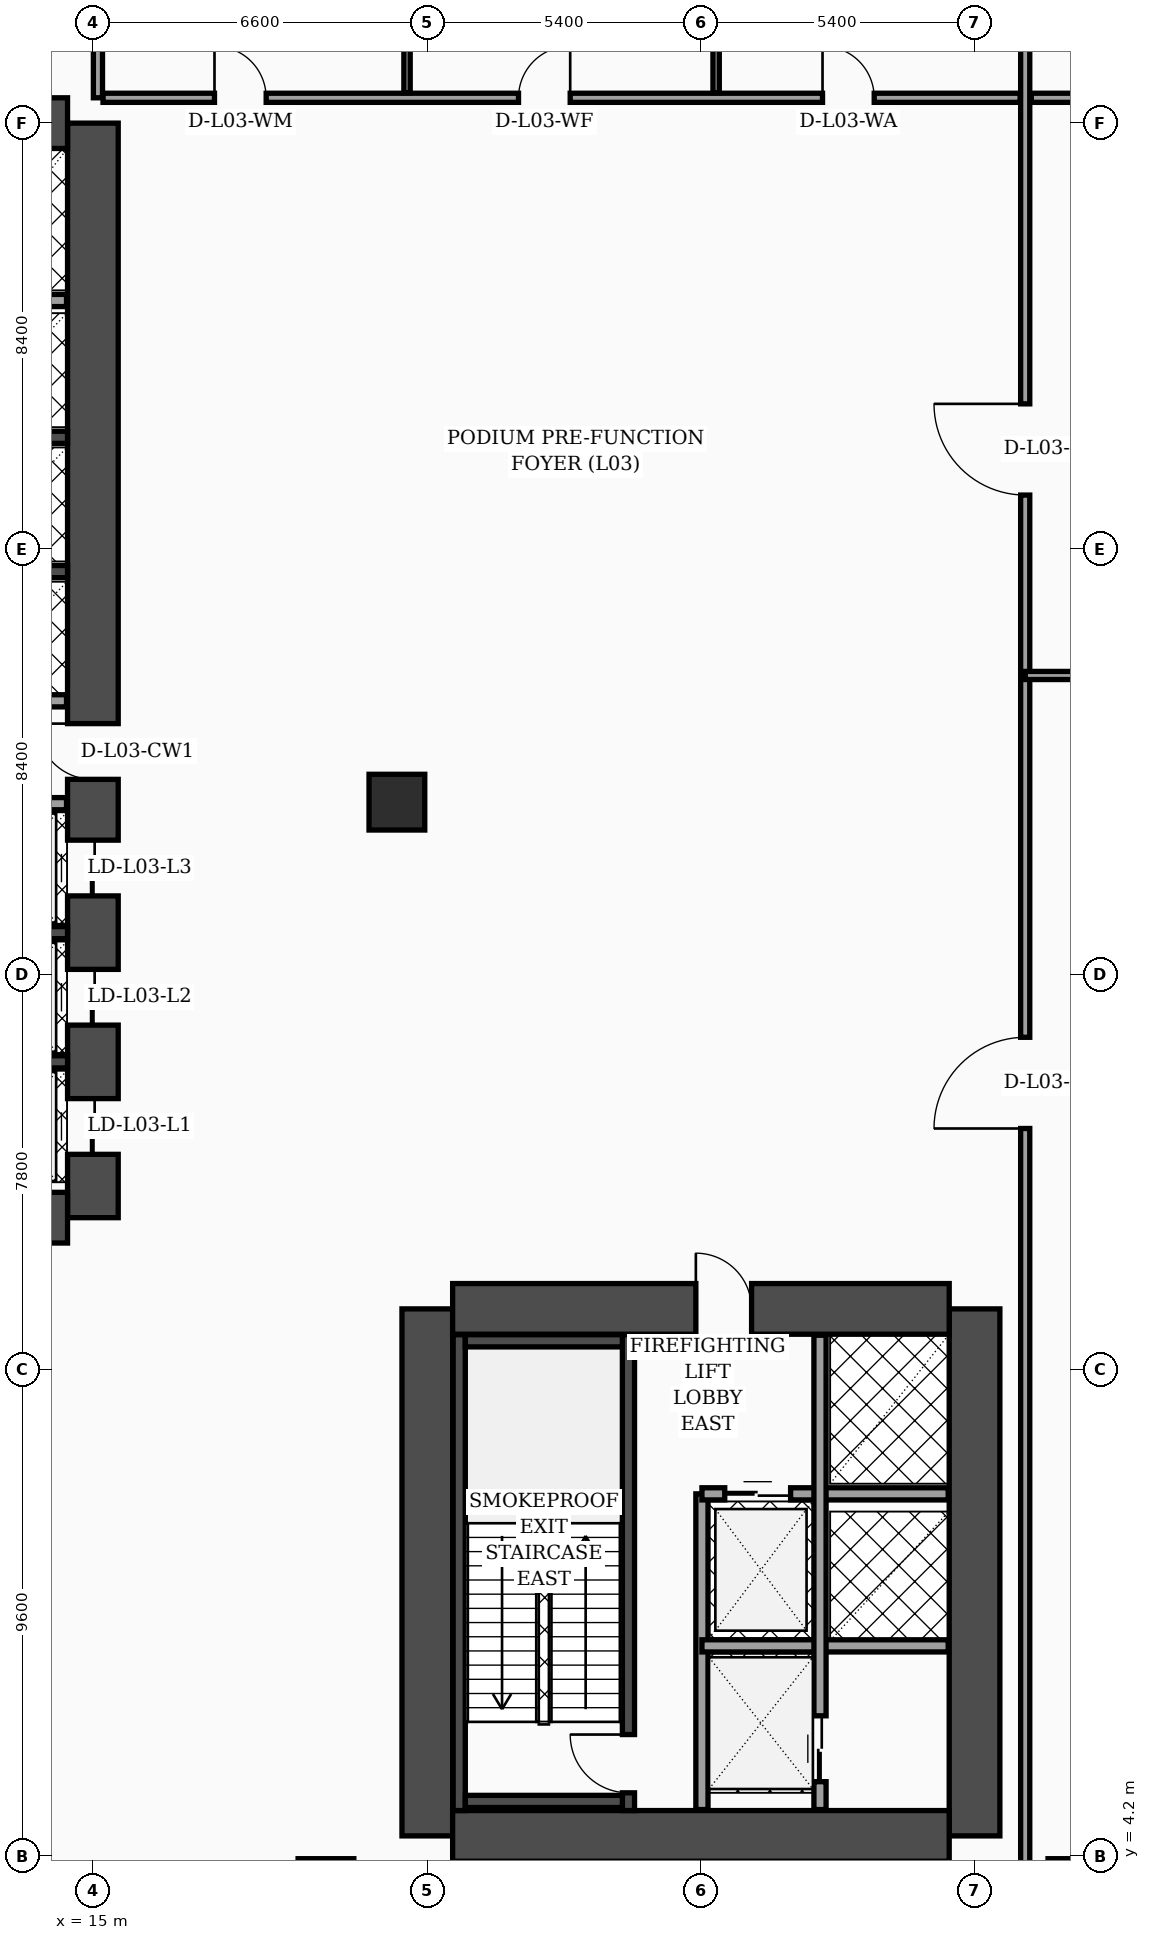
"""IFC4 building model, lengths in metres.
Left out: names, types, materials, properties, quantities, classifications, styles, units other than length and angle.
Written with IfcOpenShell. Run it as: python <this file> out.ifc"""

import sys

from ifc_helpers import new_model, si_unit, direction, frame, frame_2d, origin, origin_2d, place, context, subcontext, project, spatial, rectangle, hollow_rectangle, extrude, element, fill, save


model = new_model("IFC4")
c1 = context("Model", 3, precision=1e-05, world=origin(), true_north=direction((0.0, 1.0)))
c2 = subcontext(c1, "Body", "Model", "MODEL_VIEW")
j1 = project(units=[si_unit("LENGTHUNIT", "METRE"), si_unit("PLANEANGLEUNIT", "RADIAN")], contexts=[c1])
p1 = place(None, origin())
s1 = spatial("IfcSite", under=j1, at=p1, CompositionType="ELEMENT")
p2 = place(p1, origin())
s2 = spatial("IfcBuilding", under=s1, at=p2, CompositionType="ELEMENT")
p3 = place(p2, frame((0.0, 0.0, 17.0)))
s3 = spatial("IfcBuildingStorey", under=s2, at=p3, CompositionType="ELEMENT", Elevation=17.0)
p4 = place(p3, frame((15.0, 16.8, 0.0), z_axis=(0.0, 0.0, 1.0), x_axis=(0.0, 1.0, 0.0)))
e1 = element("IfcWall", 1, at=p4, inside=s3, PredefinedType="SHEAR", context=c2, shape_type="SweptSolid", body=[
    extrude(rectangle(XDim=21.6, YDim=1.0, at=frame_2d((10.8, 0.0))), origin(), (0.0, 0.0, 1.0), 4.55),
])
p5 = place(p4, frame((8.65, 0.0, 0.0)))
e2 = element("IfcOpeningElement", 2, at=p5, cuts=e1, PredefinedType="OPENING", context=c2, shape_type="SweptSolid", body=[
    extrude(rectangle(XDim=1.1, YDim=2.2, at=frame_2d((0.55, 1.1))), frame((0.0, 0.51, 0.0), z_axis=(0.0, -1.0, 0.0), x_axis=(1.0, 0.0, 0.0)), (0.0, 0.0, 1.0), 1.02),
])
p6 = place(p4, frame((1.25, 0.0, 0.0)))
e3 = element("IfcOpeningElement", 3, at=p6, cuts=e1, PredefinedType="OPENING", context=c2, shape_type="SweptSolid", body=[
    extrude(rectangle(XDim=1.1, YDim=2.2, at=frame_2d((0.55, 1.1))), frame((0.0, 0.51, 0.0), z_axis=(0.0, -1.0, 0.0), x_axis=(1.0, 0.0, 0.0)), (0.0, 0.0, 1.0), 1.02),
])
p7 = place(p4, frame((3.8, 0.0, 0.0)))
e4 = element("IfcOpeningElement", 4, at=p7, cuts=e1, PredefinedType="OPENING", context=c2, shape_type="SweptSolid", body=[
    extrude(rectangle(XDim=1.1, YDim=2.2, at=frame_2d((0.55, 1.1))), frame((0.0, 0.51, 0.0), z_axis=(0.0, -1.0, 0.0), x_axis=(1.0, 0.0, 0.0)), (0.0, 0.0, 1.0), 1.02),
])
p8 = place(p4, frame((6.35, 0.0, 0.0)))
e5 = element("IfcOpeningElement", 5, at=p8, cuts=e1, PredefinedType="OPENING", context=c2, shape_type="SweptSolid", body=[
    extrude(rectangle(XDim=1.1, YDim=2.2, at=frame_2d((0.55, 1.1))), frame((0.0, 0.51, 0.0), z_axis=(0.0, -1.0, 0.0), x_axis=(1.0, 0.0, 0.0)), (0.0, 0.0, 1.0), 1.02),
])
for number, where, z_axis, x_axis in (
    (6, (4.7, 38.4, 0.0), (0.0, 0.0, 1.0), (1.0, 0.0, 0.0)),
    (7, (4.7, 16.8, 0.0), (0.0, 0.0, 1.0), (1.0, 0.0, 0.0)),
):
    element("IfcWall", number, at=place(p3, frame(where, z_axis=z_axis, x_axis=x_axis)), inside=s3, PredefinedType="SHEAR", context=c2, shape_type="SweptSolid", body=[
        extrude(rectangle(XDim=9.8, YDim=1.0, at=frame_2d((4.9, 0.0))), origin(), (0.0, 0.0, 1.0), 4.55),
    ])
for number, where, z_axis, x_axis in (
    (8, (21.6, 4.6, 0.0), (0.0, 0.0, 1.0), (0.0, 1.0, 0.0)),
    (9, (32.4, 4.6, 0.0), (0.0, 0.0, 1.0), (0.0, 1.0, 0.0)),
):
    element("IfcWall", number, at=place(p3, frame(where, z_axis=z_axis, x_axis=x_axis)), inside=s3, PredefinedType="SHEAR", context=c2, shape_type="SweptSolid", body=[
        extrude(rectangle(XDim=10.4, YDim=1.0, at=frame_2d((5.2, 0.0))), origin(), (0.0, 0.0, 1.0), 4.55),
    ])
p9 = place(p3, frame((22.1, 15.0, 0.0), z_axis=(0.0, 0.0, 1.0), x_axis=(1.0, 0.0, 0.0)))
e10 = element("IfcWall", 10, at=p9, inside=s3, PredefinedType="SHEAR", context=c2, shape_type="SweptSolid", body=[
    extrude(rectangle(XDim=9.8, YDim=1.0, at=frame_2d((4.9, 0.0))), origin(), (0.0, 0.0, 1.0), 4.55),
])
p10 = place(p9, frame((4.8, 0.0, 0.0)))
e11 = element("IfcOpeningElement", 11, at=p10, cuts=e10, PredefinedType="OPENING", context=c2, shape_type="SweptSolid", body=[
    extrude(rectangle(XDim=1.1, YDim=2.2, at=frame_2d((0.55, 1.1))), frame((0.0, 0.51, 0.0), z_axis=(0.0, -1.0, 0.0), x_axis=(1.0, 0.0, 0.0)), (0.0, 0.0, 1.0), 1.02),
])
p11 = place(p3, frame((22.1, 4.6, 0.0), z_axis=(0.0, 0.0, 1.0), x_axis=(1.0, 0.0, 0.0)))
e12 = element("IfcWall", 12, at=p11, inside=s3, PredefinedType="SHEAR", context=c2, shape_type="SweptSolid", body=[
    extrude(rectangle(XDim=9.8, YDim=1.0, at=frame_2d((4.9, 0.0))), origin(), (0.0, 0.0, 1.0), 4.55),
])
p12 = place(p3, frame((22.23, 5.1, 0.0), z_axis=(0.0, 0.0, 1.0), x_axis=(0.0, 1.0, 0.0)))
e13 = element("IfcWall", 13, at=p12, inside=s3, PredefinedType="SOLIDWALL", context=c2, shape_type="SweptSolid", body=[
    extrude(rectangle(XDim=9.39, YDim=0.24, at=frame_2d((4.695, 0.0))), origin(), (0.0, 0.0, 1.0), 4.55),
])
p13 = place(p3, frame((25.57, 5.1, 0.0), z_axis=(0.0, 0.0, 1.0), x_axis=(0.0, 1.0, 0.0)))
e14 = element("IfcWall", 14, at=p13, inside=s3, PredefinedType="SOLIDWALL", context=c2, shape_type="SweptSolid", body=[
    extrude(rectangle(XDim=9.39, YDim=0.24, at=frame_2d((4.695, 0.0))), origin(), (0.0, 0.0, 1.0), 4.55),
])
p14 = place(p13, frame((0.35, 0.0, 0.0)))
e15 = element("IfcOpeningElement", 15, at=p14, cuts=e14, PredefinedType="OPENING", context=c2, shape_type="SweptSolid", body=[
    extrude(rectangle(XDim=1.15, YDim=2.2, at=frame_2d((0.575, 1.1))), frame((0.0, 0.13, 0.0), z_axis=(0.0, -1.0, 0.0), x_axis=(1.0, 0.0, 0.0)), (0.0, 0.0, 1.0), 0.26),
])
for number, where, z_axis, x_axis in (
    (16, (22.35, 5.28, 0.0), (0.0, 0.0, 1.0), (1.0, 0.0, 0.0)),
    (17, (22.35, 14.37, 0.0), (0.0, 0.0, 1.0), (1.0, 0.0, 0.0)),
):
    element("IfcWall", number, at=place(p3, frame(where, z_axis=z_axis, x_axis=x_axis)), inside=s3, PredefinedType="SOLIDWALL", context=c2, shape_type="SweptSolid", body=[
        extrude(rectangle(XDim=3.1, YDim=0.24, at=frame_2d((1.55, 0.0))), origin(), (0.0, 0.0, 1.0), 4.55),
    ])
for number, where, z_axis, x_axis in (
    (18, (12.18, 19.875, 0.0), (0.0, 0.0, 1.0), (1.0, 0.0, 0.0)),
    (19, (12.18, 22.425, 0.0), (0.0, 0.0, 1.0), (1.0, 0.0, 0.0)),
    (20, (12.18, 29.55, 0.0), (0.0, 0.0, 1.0), (1.0, 0.0, 0.0)),
    (21, (12.18, 32.2, 0.0), (0.0, 0.0, 1.0), (1.0, 0.0, 0.0)),
):
    element("IfcWall", number, at=place(p3, frame(where, z_axis=z_axis, x_axis=x_axis)), inside=s3, PredefinedType="SOLIDWALL", context=c2, shape_type="SweptSolid", body=[
        extrude(rectangle(XDim=2.32, YDim=0.24, at=frame_2d((1.16, 0.0))), origin(), (0.0, 0.0, 1.0), 4.55),
    ])
for number, where, z_axis, x_axis in (
    (22, (21.0, 25.0, 0.0), (0.0, 0.0, 1.0), (1.0, 0.0, 0.0)),
    (23, (19.6, 3.6, 0.0), (0.0, 0.0, 1.0), (1.0, 0.0, 0.0)),
    (24, (34.4, 3.6, 0.0), (0.0, 0.0, 1.0), (1.0, 0.0, 0.0)),
):
    element("IfcColumn", number, at=place(p3, frame(where, z_axis=z_axis, x_axis=x_axis)), inside=s3, PredefinedType="COLUMN", context=c2, shape_type="SweptSolid", body=[
        extrude(hollow_rectangle(XDim=1.1, YDim=1.1, WallThickness=0.045, at=origin_2d()), origin(), (0.0, 0.0, 1.0), 4.55),
    ])
p15 = place(p3, frame((12.15, 24.97, 0.0), z_axis=(0.0, 0.0, 1.0), x_axis=(1.0, 0.0, 0.0)))
e25 = element("IfcWall", 25, at=p15, inside=s3, PredefinedType="SOLIDWALL", context=c2, shape_type="SweptSolid", body=[
    extrude(rectangle(XDim=2.33, YDim=0.24, at=frame_2d((1.165, 0.0))), origin(), (0.0, 0.0, 1.0), 3.75),
])
p16 = place(p3, frame((12.25, 27.0, 0.0), z_axis=(0.0, 0.0, 1.0), x_axis=(1.0, 0.0, 0.0)))
e26 = element("IfcWall", 26, at=p16, inside=s3, PredefinedType="SOLIDWALL", context=c2, shape_type="SweptSolid", body=[
    extrude(rectangle(XDim=2.23, YDim=0.24, at=frame_2d((1.115, 0.0))), origin(), (0.0, 0.0, 1.0), 4.55),
])
p17 = place(p3, frame((9.66, 34.9, 0.0), z_axis=(0.0, 0.0, 1.0), x_axis=(1.0, 0.0, 0.0)))
e27 = element("IfcWall", 27, at=p17, inside=s3, PredefinedType="SOLIDWALL", context=c2, shape_type="SweptSolid", body=[
    extrude(rectangle(XDim=4.82, YDim=0.24, at=frame_2d((2.41, 0.0))), origin(), (0.0, 0.0, 1.0), 4.55),
])
p18 = place(p3, frame((27.02, 5.12, 0.0), z_axis=(0.0, 0.0, 1.0), x_axis=(0.0, 1.0, 0.0)))
e28 = element("IfcWall", 28, at=p18, inside=s3, PredefinedType="SOLIDWALL", context=c2, shape_type="SweptSolid", body=[
    extrude(rectangle(XDim=6.23, YDim=0.24, at=frame_2d((3.115, 0.0))), origin(), (0.0, 0.0, 1.0), 4.55),
])
p19 = place(p3, frame((27.02, 11.35, 0.0), z_axis=(0.0, 0.0, 1.0), x_axis=(1.0, 0.0, 0.0)))
e29 = element("IfcWall", 29, at=p19, inside=s3, PredefinedType="SOLIDWALL", context=c2, shape_type="SweptSolid", body=[
    extrude(rectangle(XDim=4.86, YDim=0.24, at=frame_2d((2.43, 0.0))), origin(), (0.0, 0.0, 1.0), 4.55),
])
p20 = place(p19, frame((0.45, 0.0, 0.0)))
e30 = element("IfcOpeningElement", 30, at=p20, cuts=e29, PredefinedType="OPENING", context=c2, shape_type="SweptSolid", body=[
    extrude(rectangle(XDim=1.3, YDim=2.35, at=frame_2d((0.65, 1.175))), frame((0.0, 0.13, 0.0), z_axis=(0.0, -1.0, 0.0), x_axis=(1.0, 0.0, 0.0)), (0.0, 0.0, 1.0), 0.26),
])
p21 = place(p3, frame((27.02, 8.35, 0.0), z_axis=(0.0, 0.0, 1.0), x_axis=(1.0, 0.0, 0.0)))
e31 = element("IfcWall", 31, at=p21, inside=s3, PredefinedType="SOLIDWALL", context=c2, shape_type="SweptSolid", body=[
    extrude(rectangle(XDim=4.86, YDim=0.24, at=frame_2d((2.43, 0.0))), origin(), (0.0, 0.0, 1.0), 4.55),
])
p22 = place(p3, frame((29.35, 5.12, 0.0), z_axis=(0.0, 0.0, 1.0), x_axis=(0.0, 1.0, 0.0)))
e32 = element("IfcWall", 32, at=p22, inside=s3, PredefinedType="SOLIDWALL", context=c2, shape_type="SweptSolid", body=[
    extrude(rectangle(XDim=9.36, YDim=0.24, at=frame_2d((4.68, 0.0))), origin(), (0.0, 0.0, 1.0), 4.55),
])
p23 = place(p22, frame((0.55, 0.0, 0.0)))
e33 = element("IfcOpeningElement", 33, at=p23, cuts=e32, PredefinedType="OPENING", context=c2, shape_type="SweptSolid", body=[
    extrude(rectangle(XDim=1.3, YDim=2.35, at=frame_2d((0.65, 1.175))), frame((0.0, 0.13, 0.0), z_axis=(0.0, -1.0, 0.0), x_axis=(1.0, 0.0, 0.0)), (0.0, 0.0, 1.0), 0.26),
])
p24 = place(p3, frame((15.2, 38.9, 0.0), z_axis=(0.0, 0.0, 1.0), x_axis=(1.0, 0.0, 0.0)))
e34 = element("IfcWall", 34, at=p24, inside=s3, PredefinedType="PARTITIONING", context=c2, shape_type="SweptSolid", body=[
    extrude(rectangle(XDim=18.1, YDim=0.18, at=frame_2d((9.05, 0.0))), origin(), (0.0, 0.0, 1.0), 3.75),
])
p25 = place(p24, frame((2.2, 0.0, 0.0)))
e35 = element("IfcOpeningElement", 35, at=p25, cuts=e34, PredefinedType="OPENING", context=c2, shape_type="SweptSolid", body=[
    extrude(rectangle(XDim=1.02, YDim=2.2, at=frame_2d((0.51, 1.1))), frame((0.0, 0.1, 0.0), z_axis=(0.0, -1.0, 0.0), x_axis=(1.0, 0.0, 0.0)), (0.0, 0.0, 1.0), 0.2),
])
p26 = place(p24, frame((8.2, 0.0, 0.0)))
e36 = element("IfcOpeningElement", 36, at=p26, cuts=e34, PredefinedType="OPENING", context=c2, shape_type="SweptSolid", body=[
    extrude(rectangle(XDim=1.02, YDim=2.2, at=frame_2d((0.51, 1.1))), frame((0.0, 0.1, 0.0), z_axis=(0.0, -1.0, 0.0), x_axis=(1.0, 0.0, 0.0)), (0.0, 0.0, 1.0), 0.2),
])
p27 = place(p24, frame((14.2, 0.0, 0.0)))
e37 = element("IfcOpeningElement", 37, at=p27, cuts=e34, PredefinedType="OPENING", context=c2, shape_type="SweptSolid", body=[
    extrude(rectangle(XDim=1.02, YDim=2.2, at=frame_2d((0.51, 1.1))), frame((0.0, 0.1, 0.0), z_axis=(0.0, -1.0, 0.0), x_axis=(1.0, 0.0, 0.0)), (0.0, 0.0, 1.0), 0.2),
])
p28 = place(p3, frame((15.1, 38.9, 0.0), z_axis=(0.0, 0.0, 1.0), x_axis=(0.0, 1.0, 0.0)))
e38 = element("IfcWall", 38, at=p28, inside=s3, PredefinedType="PARTITIONING", context=c2, shape_type="SweptSolid", body=[
    extrude(rectangle(XDim=6.4, YDim=0.18, at=frame_2d((3.2, 0.0))), origin(), (0.0, 0.0, 1.0), 3.75),
])
p29 = place(p3, frame((21.2, 39.0, 0.0), z_axis=(0.0, 0.0, 1.0), x_axis=(0.0, 1.0, 0.0)))
e39 = element("IfcWall", 39, at=p29, inside=s3, PredefinedType="PARTITIONING", context=c2, shape_type="SweptSolid", body=[
    extrude(rectangle(XDim=6.2, YDim=0.125, at=frame_2d((3.1, 0.0))), origin(), (0.0, 0.0, 1.0), 3.75),
])
p30 = place(p3, frame((27.3, 39.0, 0.0), z_axis=(0.0, 0.0, 1.0), x_axis=(0.0, 1.0, 0.0)))
e40 = element("IfcWall", 40, at=p30, inside=s3, PredefinedType="PARTITIONING", context=c2, shape_type="SweptSolid", body=[
    extrude(rectangle(XDim=6.2, YDim=0.125, at=frame_2d((3.1, 0.0))), origin(), (0.0, 0.0, 1.0), 4.55),
])
p31 = place(p3, frame((33.4, 0.06, 0.0), z_axis=(0.0, 0.0, 1.0), x_axis=(0.0, 1.0, 0.0)))
e41 = element("IfcWall", 41, at=p31, inside=s3, PredefinedType="PARTITIONING", context=c2, shape_type="SweptSolid", body=[
    extrude(rectangle(XDim=55.38, YDim=0.18, at=frame_2d((27.69, 0.0))), origin(), (0.0, 0.0, 1.0), 3.75),
])
p32 = place(p31, frame((18.5, 0.0, 0.0)))
e42 = element("IfcOpeningElement", 42, at=p32, cuts=e41, PredefinedType="OPENING", context=c2, shape_type="SweptSolid", body=[
    extrude(rectangle(XDim=1.8, YDim=2.4, at=frame_2d((0.9, 1.2))), frame((0.0, 0.1, 0.0), z_axis=(0.0, -1.0, 0.0), x_axis=(1.0, 0.0, 0.0)), (0.0, 0.0, 1.0), 0.2),
])
p33 = place(p31, frame((31.0, 0.0, 0.0)))
e43 = element("IfcOpeningElement", 43, at=p33, cuts=e41, PredefinedType="OPENING", context=c2, shape_type="SweptSolid", body=[
    extrude(rectangle(XDim=1.8, YDim=2.4, at=frame_2d((0.9, 1.2))), frame((0.0, 0.1, 0.0), z_axis=(0.0, -1.0, 0.0), x_axis=(1.0, 0.0, 0.0)), (0.0, 0.0, 1.0), 0.2),
])
p34 = place(p3, frame((33.4, 27.5, 0.0), z_axis=(0.0, 0.0, 1.0), x_axis=(1.0, 0.0, 0.0)))
e44 = element("IfcWall", 44, at=p34, inside=s3, PredefinedType="PARTITIONING", context=c2, shape_type="SweptSolid", body=[
    extrude(rectangle(XDim=42.54, YDim=0.16, at=frame_2d((21.27, 0.0))), origin(), (0.0, 0.0, 1.0), 3.05),
])
p35 = place(p3, frame((33.52, 38.9, 0.0), z_axis=(0.0, 0.0, 1.0), x_axis=(1.0, 0.0, 0.0)))
e45 = element("IfcWall", 45, at=p35, inside=s3, PredefinedType="PARTITIONING", context=c2, shape_type="SweptSolid", body=[
    extrude(rectangle(XDim=42.16, YDim=0.18, at=frame_2d((21.08, 0.0))), origin(), (0.0, 0.0, 1.0), 3.75),
])
p36 = place(p20, origin())
e46 = element("IfcDoor", 46, at=p36, inside=s3, OperationType="DOUBLE_DOOR_SLIDING", PredefinedType="DOOR", context=c2, shape_type="SweptSolid", body=[
    extrude(rectangle(XDim=1.3, YDim=2.35, at=frame_2d((0.65, 1.175))), frame((0.0, 0.025, 0.0), z_axis=(0.0, -1.0, 0.0), x_axis=(1.0, 0.0, 0.0)), (0.0, 0.0, 1.0), 0.05),
])
fill(e30, e46)
p37 = place(p23, origin())
e47 = element("IfcDoor", 47, at=p37, inside=s3, OperationType="DOUBLE_DOOR_SLIDING", PredefinedType="DOOR", context=c2, shape_type="SweptSolid", body=[
    extrude(rectangle(XDim=1.3, YDim=2.35, at=frame_2d((0.65, 1.175))), frame((0.0, 0.025, 0.0), z_axis=(0.0, -1.0, 0.0), x_axis=(1.0, 0.0, 0.0)), (0.0, 0.0, 1.0), 0.05),
])
fill(e33, e47)
p38 = place(p25, origin())
e48 = element("IfcDoor", 48, at=p38, inside=s3, OperationType="SINGLE_SWING_LEFT", PredefinedType="DOOR", context=c2, shape_type="SweptSolid", body=[
    extrude(rectangle(XDim=1.02, YDim=2.2, at=frame_2d((0.51, 1.1))), frame((0.0, 0.025, 0.0), z_axis=(0.0, -1.0, 0.0), x_axis=(1.0, 0.0, 0.0)), (0.0, 0.0, 1.0), 0.05),
])
fill(e35, e48)
p39 = place(p26, origin())
e49 = element("IfcDoor", 49, at=p39, inside=s3, OperationType="SINGLE_SWING_RIGHT", PredefinedType="DOOR", context=c2, shape_type="SweptSolid", body=[
    extrude(rectangle(XDim=1.02, YDim=2.2, at=frame_2d((0.51, 1.1))), frame((0.0, 0.025, 0.0), z_axis=(0.0, -1.0, 0.0), x_axis=(1.0, 0.0, 0.0)), (0.0, 0.0, 1.0), 0.05),
])
fill(e36, e49)
p40 = place(p27, origin())
e50 = element("IfcDoor", 50, at=p40, inside=s3, OperationType="SINGLE_SWING_LEFT", PredefinedType="DOOR", context=c2, shape_type="SweptSolid", body=[
    extrude(rectangle(XDim=1.02, YDim=2.2, at=frame_2d((0.51, 1.1))), frame((0.0, 0.025, 0.0), z_axis=(0.0, -1.0, 0.0), x_axis=(1.0, 0.0, 0.0)), (0.0, 0.0, 1.0), 0.05),
])
fill(e37, e50)
p41 = place(p32, origin())
e51 = element("IfcDoor", 51, at=p41, inside=s3, OperationType="SINGLE_SWING_LEFT", PredefinedType="DOOR", context=c2, shape_type="SweptSolid", body=[
    extrude(rectangle(XDim=1.8, YDim=2.4, at=frame_2d((0.9, 1.2))), frame((0.0, 0.025, 0.0), z_axis=(0.0, -1.0, 0.0), x_axis=(1.0, 0.0, 0.0)), (0.0, 0.0, 1.0), 0.05),
])
fill(e42, e51)
p42 = place(p33, origin())
e52 = element("IfcDoor", 52, at=p42, inside=s3, OperationType="SINGLE_SWING_RIGHT", PredefinedType="DOOR", context=c2, shape_type="SweptSolid", body=[
    extrude(rectangle(XDim=1.8, YDim=2.4, at=frame_2d((0.9, 1.2))), frame((0.0, 0.025, 0.0), z_axis=(0.0, -1.0, 0.0), x_axis=(1.0, 0.0, 0.0)), (0.0, 0.0, 1.0), 0.05),
])
fill(e43, e52)
p43 = place(p14, origin())
e53 = element("IfcDoor", 53, at=p43, inside=s3, OperationType="SINGLE_SWING_RIGHT", PredefinedType="DOOR", context=c2, shape_type="SweptSolid", body=[
    extrude(rectangle(XDim=1.15, YDim=2.2, at=frame_2d((0.575, 1.1))), frame((0.0, 0.025, 0.0), z_axis=(0.0, -1.0, 0.0), x_axis=(1.0, 0.0, 0.0)), (0.0, 0.0, 1.0), 0.05),
])
fill(e15, e53)
p44 = place(p5, origin())
e54 = element("IfcDoor", 54, at=p44, inside=s3, OperationType="SINGLE_SWING_RIGHT", PredefinedType="DOOR", context=c2, shape_type="SweptSolid", body=[
    extrude(rectangle(XDim=1.1, YDim=2.2, at=frame_2d((0.55, 1.1))), frame((0.0, 0.025, 0.0), z_axis=(0.0, -1.0, 0.0), x_axis=(1.0, 0.0, 0.0)), (0.0, 0.0, 1.0), 0.05),
])
fill(e2, e54)
p45 = place(p6, origin())
e55 = element("IfcDoor", 55, at=p45, inside=s3, OperationType="DOUBLE_DOOR_SLIDING", PredefinedType="DOOR", context=c2, shape_type="SweptSolid", body=[
    extrude(rectangle(XDim=1.1, YDim=2.2, at=frame_2d((0.55, 1.1))), frame((0.0, 0.025, 0.0), z_axis=(0.0, -1.0, 0.0), x_axis=(1.0, 0.0, 0.0)), (0.0, 0.0, 1.0), 0.05),
])
fill(e3, e55)
p46 = place(p7, origin())
e56 = element("IfcDoor", 56, at=p46, inside=s3, OperationType="DOUBLE_DOOR_SLIDING", PredefinedType="DOOR", context=c2, shape_type="SweptSolid", body=[
    extrude(rectangle(XDim=1.1, YDim=2.2, at=frame_2d((0.55, 1.1))), frame((0.0, 0.025, 0.0), z_axis=(0.0, -1.0, 0.0), x_axis=(1.0, 0.0, 0.0)), (0.0, 0.0, 1.0), 0.05),
])
fill(e4, e56)
p47 = place(p8, origin())
e57 = element("IfcDoor", 57, at=p47, inside=s3, OperationType="DOUBLE_DOOR_SLIDING", PredefinedType="DOOR", context=c2, shape_type="SweptSolid", body=[
    extrude(rectangle(XDim=1.1, YDim=2.2, at=frame_2d((0.55, 1.1))), frame((0.0, 0.025, 0.0), z_axis=(0.0, -1.0, 0.0), x_axis=(1.0, 0.0, 0.0)), (0.0, 0.0, 1.0), 0.05),
])
fill(e5, e57)
p48 = place(p10, origin())
e58 = element("IfcDoor", 58, at=p48, inside=s3, OperationType="SINGLE_SWING_LEFT", PredefinedType="DOOR", context=c2, shape_type="SweptSolid", body=[
    extrude(rectangle(XDim=1.1, YDim=2.2, at=frame_2d((0.55, 1.1))), frame((0.0, 0.025, 0.0), z_axis=(0.0, -1.0, 0.0), x_axis=(1.0, 0.0, 0.0)), (0.0, 0.0, 1.0), 0.05),
])
fill(e11, e58)
save(model, sys.argv[1])
